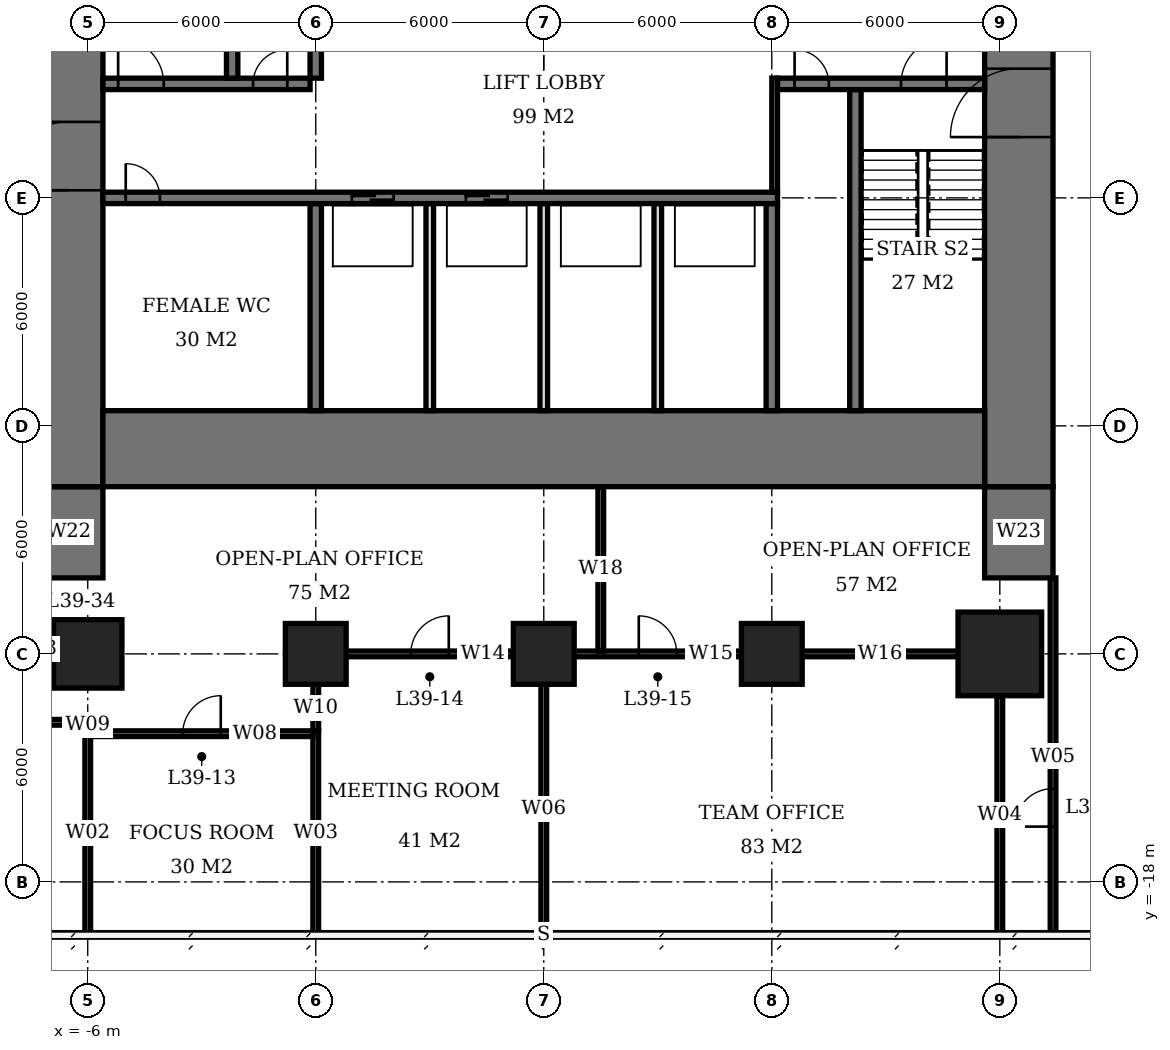
"""IFC4 building model, lengths in metres.
Left out: names, types, materials, properties, quantities, classifications, styles, units other than length and angle.
Written with IfcOpenShell. Run it as: python <this file> out.ifc"""

import sys

from ifc_helpers import new_model, si_unit, direction, frame, frame_2d, origin, origin_2d, place, context, subcontext, project, spatial, rectangle, extrude, element, fill, save


model = new_model("IFC4")
c1 = context("Model", 3, precision=1e-05, world=origin(), true_north=direction((0.0, 1.0)))
c2 = subcontext(c1, "Body", "Model", "MODEL_VIEW")
j1 = project(units=[si_unit("LENGTHUNIT", "METRE"), si_unit("PLANEANGLEUNIT", "RADIAN")], contexts=[c1])
p1 = place(None, origin())
s1 = spatial("IfcSite", under=j1, at=p1, CompositionType="ELEMENT")
p2 = place(p1, origin())
s2 = spatial("IfcBuilding", under=s1, at=p2, CompositionType="ELEMENT")
p3 = place(p2, frame((0.0, 0.0, 160.1)))
s3 = spatial("IfcBuildingStorey", under=s2, at=p3, CompositionType="ELEMENT", Elevation=160.1)
p4 = place(p3, frame((-6.0, -12.0, 0.0), z_axis=(0.0, 0.0, 1.0), x_axis=(1.0, 0.0, 0.0)))
e1 = element("IfcColumn", 1, at=p4, inside=s3, PredefinedType="COLUMN", context=c2, shape_type="SweptSolid", body=[
    extrude(rectangle(XDim=1.8, YDim=1.8, at=origin_2d()), origin(), (0.0, 0.0, 1.0), 3.9),
])
for number, where, z_axis, x_axis in (
    (2, (0.0, -12.0, 0.0), (0.0, 0.0, 1.0), (1.0, 0.0, 0.0)),
    (3, (6.0, -12.0, 0.0), (0.0, 0.0, 1.0), (1.0, 0.0, 0.0)),
    (4, (12.0, -12.0, 0.0), (0.0, 0.0, 1.0), (1.0, 0.0, 0.0)),
):
    element("IfcColumn", number, at=place(p3, frame(where, z_axis=z_axis, x_axis=x_axis)), inside=s3, PredefinedType="COLUMN", context=c2, shape_type="SweptSolid", body=[
        extrude(rectangle(XDim=1.6, YDim=1.6, at=origin_2d()), origin(), (0.0, 0.0, 1.0), 3.9),
    ])
p5 = place(p3, frame((18.0, -12.0, 0.0), z_axis=(0.0, 0.0, 1.0), x_axis=(1.0, 0.0, 0.0)))
e5 = element("IfcColumn", 5, at=p5, inside=s3, PredefinedType="COLUMN", context=c2, shape_type="SweptSolid", body=[
    extrude(rectangle(XDim=2.2, YDim=2.2, at=origin_2d()), origin(), (0.0, 0.0, 1.0), 3.9),
])
p6 = place(p3, frame((-5.6, -6.6, 0.0), z_axis=(0.0, 0.0, 1.0), x_axis=(1.0, 0.0, 0.0)))
e6 = element("IfcWall", 6, at=p6, inside=s3, PredefinedType="SHEAR", context=c2, shape_type="SweptSolid", body=[
    extrude(rectangle(XDim=23.2, YDim=2.0, at=frame_2d((11.6, 0.0))), origin(), (0.0, 0.0, 1.0), 3.9),
])
p7 = place(p3, frame((-6.5, -7.6, 0.0), z_axis=(0.0, 0.0, 1.0), x_axis=(0.0, 1.0, 0.0)))
e7 = element("IfcWall", 7, at=p7, inside=s3, PredefinedType="SHEAR", context=c2, shape_type="SweptSolid", body=[
    extrude(rectangle(XDim=21.2, YDim=1.8, at=frame_2d((10.6, 0.0))), origin(), (0.0, 0.0, 1.0), 3.9),
])
p8 = place(p7, frame((7.8, 0.0, 0.0)))
e8 = element("IfcOpeningElement", 8, at=p8, cuts=e7, PredefinedType="OPENING", context=c2, shape_type="SweptSolid", body=[
    extrude(rectangle(XDim=1.8, YDim=2.4, at=frame_2d((0.9, 1.2))), frame((0.0, 0.91, 0.0), z_axis=(0.0, -1.0, 0.0), x_axis=(1.0, 0.0, 0.0)), (0.0, 0.0, 1.0), 1.82),
])
p9 = place(p3, frame((18.5, -7.6, 0.0), z_axis=(0.0, 0.0, 1.0), x_axis=(0.0, 1.0, 0.0)))
e9 = element("IfcWall", 9, at=p9, inside=s3, PredefinedType="SHEAR", context=c2, shape_type="SweptSolid", body=[
    extrude(rectangle(XDim=21.2, YDim=1.8, at=frame_2d((10.6, 0.0))), origin(), (0.0, 0.0, 1.0), 3.9),
])
p10 = place(p9, frame((9.2, 0.0, 0.0)))
e10 = element("IfcOpeningElement", 10, at=p10, cuts=e9, PredefinedType="OPENING", context=c2, shape_type="SweptSolid", body=[
    extrude(rectangle(XDim=1.8, YDim=2.4, at=frame_2d((0.9, 1.2))), frame((0.0, 0.91, 0.0), z_axis=(0.0, -1.0, 0.0), x_axis=(1.0, 0.0, 0.0)), (0.0, 0.0, 1.0), 1.82),
])
for number, where, z_axis, x_axis in (
    (11, (-6.5, -10.0, 0.0), (0.0, 0.0, 1.0), (0.0, 1.0, 0.0)),
    (12, (18.5, -10.0, 0.0), (0.0, 0.0, 1.0), (0.0, 1.0, 0.0)),
):
    element("IfcWall", number, at=place(p3, frame(where, z_axis=z_axis, x_axis=x_axis)), inside=s3, PredefinedType="SHEAR", context=c2, shape_type="SweptSolid", body=[
        extrude(rectangle(XDim=2.4, YDim=1.8, at=frame_2d((1.2, 0.0))), origin(), (0.0, 0.0, 1.0), 3.9),
    ])
p11 = place(p3, frame((-5.6, 0.0, 0.0), z_axis=(0.0, 0.0, 1.0), x_axis=(1.0, 0.0, 0.0)))
e13 = element("IfcWall", 13, at=p11, inside=s3, PredefinedType="SHEAR", context=c2, shape_type="SweptSolid", body=[
    extrude(rectangle(XDim=17.75, YDim=0.3, at=frame_2d((8.875, 0.0))), origin(), (0.0, 0.0, 1.0), 3.9),
])
p12 = place(p11, frame((0.6, 0.0, 0.0)))
e14 = element("IfcOpeningElement", 14, at=p12, cuts=e13, PredefinedType="OPENING", context=c2, shape_type="SweptSolid", body=[
    extrude(rectangle(XDim=0.9, YDim=2.1, at=frame_2d((0.45, 1.05))), frame((0.0, 0.16, 0.0), z_axis=(0.0, -1.0, 0.0), x_axis=(1.0, 0.0, 0.0)), (0.0, 0.0, 1.0), 0.32),
])
p13 = place(p11, frame((6.55, 0.0, 0.0)))
e15 = element("IfcOpeningElement", 15, at=p13, cuts=e13, PredefinedType="OPENING", context=c2, shape_type="SweptSolid", body=[
    extrude(rectangle(XDim=1.1, YDim=2.1, at=frame_2d((0.55, 1.05))), frame((0.0, 0.16, 0.0), z_axis=(0.0, -1.0, 0.0), x_axis=(1.0, 0.0, 0.0)), (0.0, 0.0, 1.0), 0.32),
])
p14 = place(p11, frame((9.55, 0.0, 0.0)))
e16 = element("IfcOpeningElement", 16, at=p14, cuts=e13, PredefinedType="OPENING", context=c2, shape_type="SweptSolid", body=[
    extrude(rectangle(XDim=1.1, YDim=2.1, at=frame_2d((0.55, 1.05))), frame((0.0, 0.16, 0.0), z_axis=(0.0, -1.0, 0.0), x_axis=(1.0, 0.0, 0.0)), (0.0, 0.0, 1.0), 0.32),
])
p15 = place(p3, frame((-5.6, 3.0, 0.0), z_axis=(0.0, 0.0, 1.0), x_axis=(1.0, 0.0, 0.0)))
e17 = element("IfcWall", 17, at=p15, inside=s3, PredefinedType="SHEAR", context=c2, shape_type="SweptSolid", body=[
    extrude(rectangle(XDim=5.45, YDim=0.3, at=frame_2d((2.725, 0.0))), origin(), (0.0, 0.0, 1.0), 3.9),
])
p16 = place(p15, frame((0.4, 0.0, 0.0)))
e18 = element("IfcOpeningElement", 18, at=p16, cuts=e17, PredefinedType="OPENING", context=c2, shape_type="SweptSolid", body=[
    extrude(rectangle(XDim=1.2, YDim=2.1, at=frame_2d((0.6, 1.05))), frame((0.0, 0.16, 0.0), z_axis=(0.0, -1.0, 0.0), x_axis=(1.0, 0.0, 0.0)), (0.0, 0.0, 1.0), 0.32),
])
p17 = place(p15, frame((3.95, 0.0, 0.0)))
e19 = element("IfcOpeningElement", 19, at=p17, cuts=e17, PredefinedType="OPENING", context=c2, shape_type="SweptSolid", body=[
    extrude(rectangle(XDim=0.9, YDim=2.1, at=frame_2d((0.45, 1.05))), frame((0.0, 0.16, 0.0), z_axis=(0.0, -1.0, 0.0), x_axis=(1.0, 0.0, 0.0)), (0.0, 0.0, 1.0), 0.32),
])
p18 = place(p3, frame((12.15, 3.0, 0.0), z_axis=(0.0, 0.0, 1.0), x_axis=(1.0, 0.0, 0.0)))
e20 = element("IfcWall", 20, at=p18, inside=s3, PredefinedType="SHEAR", context=c2, shape_type="SweptSolid", body=[
    extrude(rectangle(XDim=5.45, YDim=0.3, at=frame_2d((2.725, 0.0))), origin(), (0.0, 0.0, 1.0), 3.9),
])
p19 = place(p18, frame((3.25, 0.0, 0.0)))
e21 = element("IfcOpeningElement", 21, at=p19, cuts=e20, PredefinedType="OPENING", context=c2, shape_type="SweptSolid", body=[
    extrude(rectangle(XDim=1.2, YDim=2.1, at=frame_2d((0.6, 1.05))), frame((0.0, 0.16, 0.0), z_axis=(0.0, -1.0, 0.0), x_axis=(1.0, 0.0, 0.0)), (0.0, 0.0, 1.0), 0.32),
])
p20 = place(p18, frame((0.45, 0.0, 0.0)))
e22 = element("IfcOpeningElement", 22, at=p20, cuts=e20, PredefinedType="OPENING", context=c2, shape_type="SweptSolid", body=[
    extrude(rectangle(XDim=0.9, YDim=2.1, at=frame_2d((0.45, 1.05))), frame((0.0, 0.16, 0.0), z_axis=(0.0, -1.0, 0.0), x_axis=(1.0, 0.0, 0.0)), (0.0, 0.0, 1.0), 0.32),
])
p21 = place(p3, frame((0.0, -5.6, 0.0), z_axis=(0.0, 0.0, 1.0), x_axis=(0.0, 1.0, 0.0)))
e23 = element("IfcWall", 23, at=p21, inside=s3, PredefinedType="SHEAR", context=c2, shape_type="SweptSolid", body=[
    extrude(rectangle(XDim=5.45, YDim=0.3, at=frame_2d((2.725, 0.0))), origin(), (0.0, 0.0, 1.0), 3.9),
])
p22 = place(p3, frame((0.0, 3.15, 0.0), z_axis=(0.0, 0.0, 1.0), x_axis=(0.0, 1.0, 0.0)))
e24 = element("IfcWall", 24, at=p22, inside=s3, PredefinedType="SHEAR", context=c2, shape_type="SweptSolid", body=[
    extrude(rectangle(XDim=8.45, YDim=0.3, at=frame_2d((4.225, 0.0))), origin(), (0.0, 0.0, 1.0), 3.9),
])
p23 = place(p3, frame((12.0, -5.6, 0.0), z_axis=(0.0, 0.0, 1.0), x_axis=(0.0, 1.0, 0.0)))
e25 = element("IfcWall", 25, at=p23, inside=s3, PredefinedType="SHEAR", context=c2, shape_type="SweptSolid", body=[
    extrude(rectangle(XDim=5.45, YDim=0.3, at=frame_2d((2.725, 0.0))), origin(), (0.0, 0.0, 1.0), 3.9),
])
for number, where, z_axis, x_axis in (
    (26, (-2.2, 3.15, 0.0), (0.0, 0.0, 1.0), (0.0, 1.0, 0.0)),
    (27, (14.2, -5.6, 0.0), (0.0, 0.0, 1.0), (0.0, 1.0, 0.0)),
):
    element("IfcWall", number, at=place(p3, frame(where, z_axis=z_axis, x_axis=x_axis)), inside=s3, PredefinedType="SHEAR", context=c2, shape_type="SweptSolid", body=[
        extrude(rectangle(XDim=8.45, YDim=0.3, at=frame_2d((4.225, 0.0))), origin(), (0.0, 0.0, 1.0), 3.9),
    ])
for number, where, z_axis, x_axis in (
    (28, (3.0, -5.6, 0.0), (0.0, 0.0, 1.0), (0.0, 1.0, 0.0)),
    (29, (6.0, -5.6, 0.0), (0.0, 0.0, 1.0), (0.0, 1.0, 0.0)),
    (30, (9.0, -5.6, 0.0), (0.0, 0.0, 1.0), (0.0, 1.0, 0.0)),
):
    element("IfcWall", number, at=place(p3, frame(where, z_axis=z_axis, x_axis=x_axis)), inside=s3, PredefinedType="SOLIDWALL", context=c2, shape_type="SweptSolid", body=[
        extrude(rectangle(XDim=5.45, YDim=0.2, at=frame_2d((2.725, 0.0))), origin(), (0.0, 0.0, 1.0), 3.9),
    ])
p24 = place(p3, frame((-5.925, -14.1, 0.0), z_axis=(0.0, 0.0, 1.0), x_axis=(1.0, 0.0, 0.0)))
e31 = element("IfcWall", 31, at=p24, inside=s3, PredefinedType="PARTITIONING", context=c2, shape_type="SweptSolid", body=[
    extrude(rectangle(XDim=5.85, YDim=0.15, at=frame_2d((2.925, 0.0))), origin(), (0.0, 0.0, 1.0), 3.65),
])
p25 = place(p24, frame((2.425, 0.0, 0.0)))
e32 = element("IfcOpeningElement", 32, at=p25, cuts=e31, PredefinedType="OPENING", context=c2, shape_type="SweptSolid", body=[
    extrude(rectangle(XDim=1.0, YDim=2.1, at=frame_2d((0.5, 1.05))), frame((0.0, 0.085, 0.0), z_axis=(0.0, -1.0, 0.0), x_axis=(1.0, 0.0, 0.0)), (0.0, 0.0, 1.0), 0.17),
])
p26 = place(p3, frame((-11.925, -13.8, 0.0), z_axis=(0.0, 0.0, 1.0), x_axis=(1.0, 0.0, 0.0)))
e33 = element("IfcWall", 33, at=p26, inside=s3, PredefinedType="PARTITIONING", context=c2, shape_type="SweptSolid", body=[
    extrude(rectangle(XDim=5.85, YDim=0.15, at=frame_2d((2.925, 0.0))), origin(), (0.0, 0.0, 1.0), 3.65),
])
p27 = place(p26, frame((2.525, 0.0, 0.0)))
e34 = element("IfcOpeningElement", 34, at=p27, cuts=e33, PredefinedType="OPENING", context=c2, shape_type="SweptSolid", body=[
    extrude(rectangle(XDim=1.0, YDim=2.1, at=frame_2d((0.5, 1.05))), frame((0.0, 0.085, 0.0), z_axis=(0.0, -1.0, 0.0), x_axis=(1.0, 0.0, 0.0)), (0.0, 0.0, 1.0), 0.17),
])
p28 = place(p3, frame((0.8, -12.0, 0.0), z_axis=(0.0, 0.0, 1.0), x_axis=(1.0, 0.0, 0.0)))
e35 = element("IfcWall", 35, at=p28, inside=s3, PredefinedType="PARTITIONING", context=c2, shape_type="SweptSolid", body=[
    extrude(rectangle(XDim=4.4, YDim=0.15, at=frame_2d((2.2, 0.0))), origin(), (0.0, 0.0, 1.0), 3.65),
])
p29 = place(p28, frame((1.7, 0.0, 0.0)))
e36 = element("IfcOpeningElement", 36, at=p29, cuts=e35, PredefinedType="OPENING", context=c2, shape_type="SweptSolid", body=[
    extrude(rectangle(XDim=1.0, YDim=2.1, at=frame_2d((0.5, 1.05))), frame((0.0, 0.085, 0.0), z_axis=(0.0, -1.0, 0.0), x_axis=(1.0, 0.0, 0.0)), (0.0, 0.0, 1.0), 0.17),
])
p30 = place(p3, frame((6.8, -12.0, 0.0), z_axis=(0.0, 0.0, 1.0), x_axis=(1.0, 0.0, 0.0)))
e37 = element("IfcWall", 37, at=p30, inside=s3, PredefinedType="PARTITIONING", context=c2, shape_type="SweptSolid", body=[
    extrude(rectangle(XDim=4.4, YDim=0.15, at=frame_2d((2.2, 0.0))), origin(), (0.0, 0.0, 1.0), 3.65),
])
p31 = place(p30, frame((1.7, 0.0, 0.0)))
e38 = element("IfcOpeningElement", 38, at=p31, cuts=e37, PredefinedType="OPENING", context=c2, shape_type="SweptSolid", body=[
    extrude(rectangle(XDim=1.0, YDim=2.1, at=frame_2d((0.5, 1.05))), frame((0.0, 0.085, 0.0), z_axis=(0.0, -1.0, 0.0), x_axis=(1.0, 0.0, 0.0)), (0.0, 0.0, 1.0), 0.17),
])
p32 = place(p3, frame((12.8, -12.0, 0.0), z_axis=(0.0, 0.0, 1.0), x_axis=(1.0, 0.0, 0.0)))
e39 = element("IfcWall", 39, at=p32, inside=s3, PredefinedType="PARTITIONING", context=c2, shape_type="SweptSolid", body=[
    extrude(rectangle(XDim=4.1, YDim=0.15, at=frame_2d((2.05, 0.0))), origin(), (0.0, 0.0, 1.0), 3.65),
])
p33 = place(p3, frame((-6.0, -19.4, 0.0), z_axis=(0.0, 0.0, 1.0), x_axis=(0.0, 1.0, 0.0)))
e40 = element("IfcWall", 40, at=p33, inside=s3, PredefinedType="PARTITIONING", context=c2, shape_type="SweptSolid", body=[
    extrude(rectangle(XDim=5.375, YDim=0.15, at=frame_2d((2.688, 0.0))), origin(), (0.0, 0.0, 1.0), 3.65),
])
p34 = place(p3, frame((-6.0, -14.025, 0.0), z_axis=(0.0, 0.0, 1.0), x_axis=(0.0, 1.0, 0.0)))
e41 = element("IfcWall", 41, at=p34, inside=s3, PredefinedType="PARTITIONING", context=c2, shape_type="SweptSolid", body=[
    extrude(rectangle(XDim=0.3, YDim=0.15, at=frame_2d((0.15, 0.0))), origin(), (0.0, 0.0, 1.0), 3.65),
])
p35 = place(p3, frame((0.0, -19.4, 0.0), z_axis=(0.0, 0.0, 1.0), x_axis=(0.0, 1.0, 0.0)))
e42 = element("IfcWall", 42, at=p35, inside=s3, PredefinedType="PARTITIONING", context=c2, shape_type="SweptSolid", body=[
    extrude(rectangle(XDim=5.375, YDim=0.15, at=frame_2d((2.688, 0.0))), origin(), (0.0, 0.0, 1.0), 3.65),
])
p36 = place(p3, frame((0.0, -14.025, 0.0), z_axis=(0.0, 0.0, 1.0), x_axis=(0.0, 1.0, 0.0)))
e43 = element("IfcWall", 43, at=p36, inside=s3, PredefinedType="PARTITIONING", context=c2, shape_type="SweptSolid", body=[
    extrude(rectangle(XDim=1.225, YDim=0.15, at=frame_2d((0.612, 0.0))), origin(), (0.0, 0.0, 1.0), 3.65),
])
p37 = place(p3, frame((6.0, -19.35, 0.0), z_axis=(0.0, 0.0, 1.0), x_axis=(0.0, 1.0, 0.0)))
e44 = element("IfcWall", 44, at=p37, inside=s3, PredefinedType="PARTITIONING", context=c2, shape_type="SweptSolid", body=[
    extrude(rectangle(XDim=6.55, YDim=0.15, at=frame_2d((3.275, 0.0))), origin(), (0.0, 0.0, 1.0), 3.65),
])
p38 = place(p3, frame((18.0, -19.4, 0.0), z_axis=(0.0, 0.0, 1.0), x_axis=(0.0, 1.0, 0.0)))
e45 = element("IfcWall", 45, at=p38, inside=s3, PredefinedType="PARTITIONING", context=c2, shape_type="SweptSolid", body=[
    extrude(rectangle(XDim=6.3, YDim=0.15, at=frame_2d((3.15, 0.0))), origin(), (0.0, 0.0, 1.0), 3.65),
])
p39 = place(p3, frame((7.5, -11.925, 0.0), z_axis=(0.0, 0.0, 1.0), x_axis=(0.0, 1.0, 0.0)))
e46 = element("IfcWall", 46, at=p39, inside=s3, PredefinedType="PARTITIONING", context=c2, shape_type="SweptSolid", body=[
    extrude(rectangle(XDim=4.325, YDim=0.15, at=frame_2d((2.163, 0.0))), origin(), (0.0, 0.0, 1.0), 3.65),
])
p40 = place(p3, frame((19.4, -19.4, 0.0), z_axis=(0.0, 0.0, 1.0), x_axis=(0.0, 1.0, 0.0)))
e47 = element("IfcWall", 47, at=p40, inside=s3, PredefinedType="PARTITIONING", context=c2, shape_type="SweptSolid", body=[
    extrude(rectangle(XDim=9.4, YDim=0.15, at=frame_2d((4.7, 0.0))), origin(), (0.0, 0.0, 1.0), 3.65),
])
p41 = place(p40, frame((2.855, 0.0, 0.0)))
e48 = element("IfcOpeningElement", 48, at=p41, cuts=e47, PredefinedType="OPENING", context=c2, shape_type="SweptSolid", body=[
    extrude(rectangle(XDim=1.0, YDim=2.1, at=frame_2d((0.5, 1.05))), frame((0.0, 0.085, 0.0), z_axis=(0.0, -1.0, 0.0), x_axis=(1.0, 0.0, 0.0)), (0.0, 0.0, 1.0), 0.17),
])
p42 = place(p3, frame((12.075, 0.15, 0.0), z_axis=(0.0, 0.0, 1.0), x_axis=(0.0, 1.0, 0.0)))
e49 = element("IfcWall", 49, at=p42, inside=s3, PredefinedType="PARTITIONING", context=c2, shape_type="SweptSolid", body=[
    extrude(rectangle(XDim=3.0, YDim=0.15, at=frame_2d((1.5, 0.0))), origin(), (0.0, 0.0, 1.0), 3.65),
])
p43 = place(p8, origin())
e50 = element("IfcDoor", 50, at=p43, inside=s3, OperationType="DOUBLE_DOOR_SINGLE_SWING", PredefinedType="DOOR", context=c2, shape_type="SweptSolid", body=[
    extrude(rectangle(XDim=1.8, YDim=2.4, at=frame_2d((0.9, 1.2))), frame((0.0, 0.025, 0.0), z_axis=(0.0, -1.0, 0.0), x_axis=(1.0, 0.0, 0.0)), (0.0, 0.0, 1.0), 0.05),
])
fill(e8, e50)
p44 = place(p10, origin())
e51 = element("IfcDoor", 51, at=p44, inside=s3, OperationType="DOUBLE_DOOR_SINGLE_SWING", PredefinedType="DOOR", context=c2, shape_type="SweptSolid", body=[
    extrude(rectangle(XDim=1.8, YDim=2.4, at=frame_2d((0.9, 1.2))), frame((0.0, 0.025, 0.0), z_axis=(0.0, -1.0, 0.0), x_axis=(1.0, 0.0, 0.0)), (0.0, 0.0, 1.0), 0.05),
])
fill(e10, e51)
p45 = place(p16, origin())
e52 = element("IfcDoor", 52, at=p45, inside=s3, OperationType="SINGLE_SWING_LEFT", PredefinedType="DOOR", context=c2, shape_type="SweptSolid", body=[
    extrude(rectangle(XDim=1.2, YDim=2.1, at=frame_2d((0.6, 1.05))), frame((0.0, 0.025, 0.0), z_axis=(0.0, -1.0, 0.0), x_axis=(1.0, 0.0, 0.0)), (0.0, 0.0, 1.0), 0.05),
])
fill(e18, e52)
p46 = place(p17, origin())
e53 = element("IfcDoor", 53, at=p46, inside=s3, OperationType="SINGLE_SWING_RIGHT", PredefinedType="DOOR", context=c2, shape_type="SweptSolid", body=[
    extrude(rectangle(XDim=0.9, YDim=2.1, at=frame_2d((0.45, 1.05))), frame((0.0, 0.025, 0.0), z_axis=(0.0, -1.0, 0.0), x_axis=(1.0, 0.0, 0.0)), (0.0, 0.0, 1.0), 0.05),
])
fill(e19, e53)
p47 = place(p19, origin())
e54 = element("IfcDoor", 54, at=p47, inside=s3, OperationType="SINGLE_SWING_RIGHT", PredefinedType="DOOR", context=c2, shape_type="SweptSolid", body=[
    extrude(rectangle(XDim=1.2, YDim=2.1, at=frame_2d((0.6, 1.05))), frame((0.0, 0.025, 0.0), z_axis=(0.0, -1.0, 0.0), x_axis=(1.0, 0.0, 0.0)), (0.0, 0.0, 1.0), 0.05),
])
fill(e21, e54)
p48 = place(p20, origin())
e55 = element("IfcDoor", 55, at=p48, inside=s3, OperationType="SINGLE_SWING_LEFT", PredefinedType="DOOR", context=c2, shape_type="SweptSolid", body=[
    extrude(rectangle(XDim=0.9, YDim=2.1, at=frame_2d((0.45, 1.05))), frame((0.0, 0.025, 0.0), z_axis=(0.0, -1.0, 0.0), x_axis=(1.0, 0.0, 0.0)), (0.0, 0.0, 1.0), 0.05),
])
fill(e22, e55)
p49 = place(p12, origin())
e56 = element("IfcDoor", 56, at=p49, inside=s3, OperationType="SINGLE_SWING_LEFT", PredefinedType="DOOR", context=c2, shape_type="SweptSolid", body=[
    extrude(rectangle(XDim=0.9, YDim=2.1, at=frame_2d((0.45, 1.05))), frame((0.0, 0.025, 0.0), z_axis=(0.0, -1.0, 0.0), x_axis=(1.0, 0.0, 0.0)), (0.0, 0.0, 1.0), 0.05),
])
fill(e14, e56)
p50 = place(p13, origin())
e57 = element("IfcDoor", 57, at=p50, inside=s3, OperationType="DOUBLE_DOOR_SLIDING", PredefinedType="USERDEFINED", context=c2, shape_type="SweptSolid", body=[
    extrude(rectangle(XDim=1.1, YDim=2.1, at=frame_2d((0.55, 1.05))), frame((0.0, 0.025, 0.0), z_axis=(0.0, -1.0, 0.0), x_axis=(1.0, 0.0, 0.0)), (0.0, 0.0, 1.0), 0.05),
])
fill(e15, e57)
p51 = place(p14, origin())
e58 = element("IfcDoor", 58, at=p51, inside=s3, OperationType="DOUBLE_DOOR_SLIDING", PredefinedType="USERDEFINED", context=c2, shape_type="SweptSolid", body=[
    extrude(rectangle(XDim=1.1, YDim=2.1, at=frame_2d((0.55, 1.05))), frame((0.0, 0.025, 0.0), z_axis=(0.0, -1.0, 0.0), x_axis=(1.0, 0.0, 0.0)), (0.0, 0.0, 1.0), 0.05),
])
fill(e16, e58)
p52 = place(p25, origin())
e59 = element("IfcDoor", 59, at=p52, inside=s3, OperationType="SINGLE_SWING_RIGHT", PredefinedType="DOOR", context=c2, shape_type="SweptSolid", body=[
    extrude(rectangle(XDim=1.0, YDim=2.1, at=frame_2d((0.5, 1.05))), frame((0.0, 0.025, 0.0), z_axis=(0.0, -1.0, 0.0), x_axis=(1.0, 0.0, 0.0)), (0.0, 0.0, 1.0), 0.05),
])
fill(e32, e59)
p53 = place(p29, origin())
e60 = element("IfcDoor", 60, at=p53, inside=s3, OperationType="SINGLE_SWING_RIGHT", PredefinedType="DOOR", context=c2, shape_type="SweptSolid", body=[
    extrude(rectangle(XDim=1.0, YDim=2.1, at=frame_2d((0.5, 1.05))), frame((0.0, 0.025, 0.0), z_axis=(0.0, -1.0, 0.0), x_axis=(1.0, 0.0, 0.0)), (0.0, 0.0, 1.0), 0.05),
])
fill(e36, e60)
p54 = place(p31, origin())
e61 = element("IfcDoor", 61, at=p54, inside=s3, OperationType="SINGLE_SWING_LEFT", PredefinedType="DOOR", context=c2, shape_type="SweptSolid", body=[
    extrude(rectangle(XDim=1.0, YDim=2.1, at=frame_2d((0.5, 1.05))), frame((0.0, 0.025, 0.0), z_axis=(0.0, -1.0, 0.0), x_axis=(1.0, 0.0, 0.0)), (0.0, 0.0, 1.0), 0.05),
])
fill(e38, e61)
p55 = place(p41, origin())
e62 = element("IfcDoor", 62, at=p55, inside=s3, OperationType="SINGLE_SWING_LEFT", PredefinedType="DOOR", context=c2, shape_type="SweptSolid", body=[
    extrude(rectangle(XDim=1.0, YDim=2.1, at=frame_2d((0.5, 1.05))), frame((0.0, 0.025, 0.0), z_axis=(0.0, -1.0, 0.0), x_axis=(1.0, 0.0, 0.0)), (0.0, 0.0, 1.0), 0.05),
])
fill(e48, e62)
save(model, sys.argv[1])
